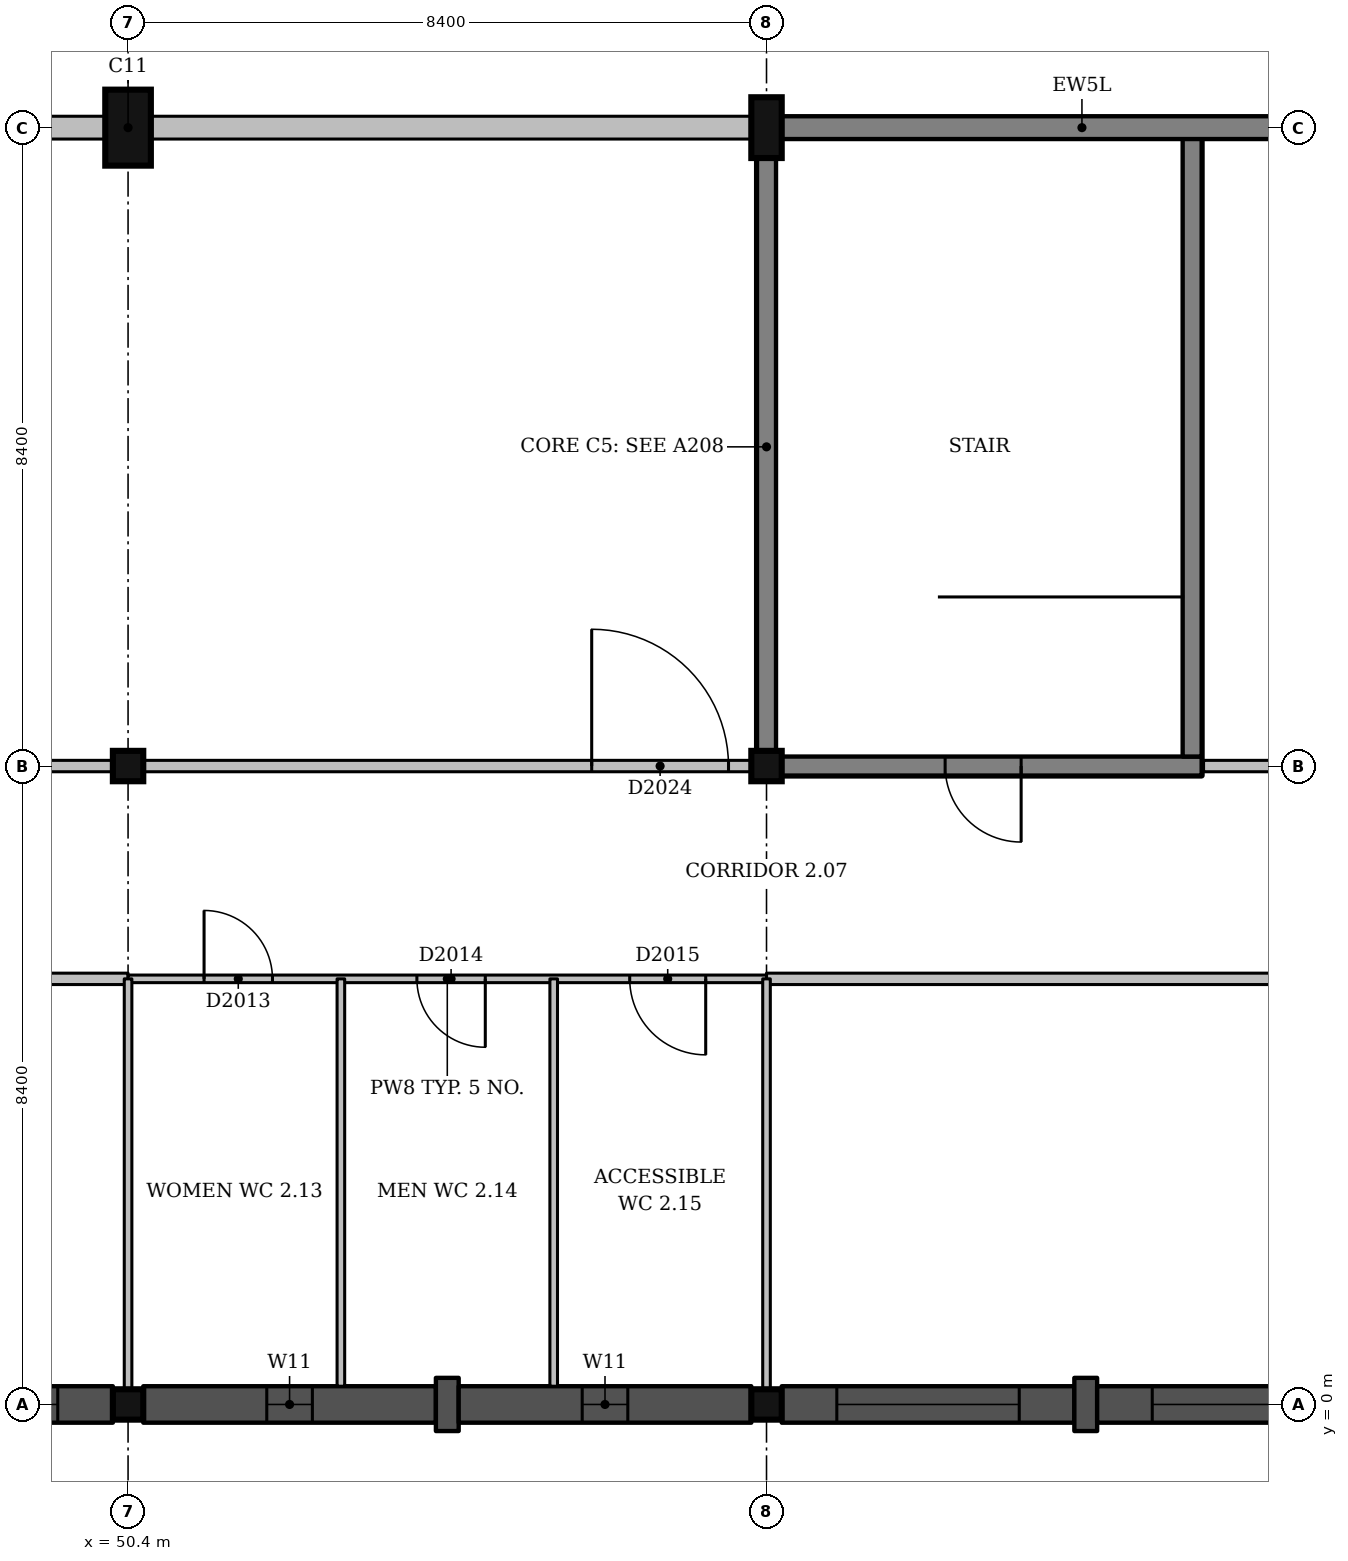
"""IFC4 building model, lengths in metres.
Left out: names, types, materials, properties, quantities, classifications, styles, units other than length and angle.
Written with IfcOpenShell. Run it as: python <this file> out.ifc"""

import sys

from ifc_helpers import new_model, si_unit, direction, frame, frame_2d, origin, origin_2d, place, context, subcontext, project, spatial, rectangle, extrude, element, fill, save


model = new_model("IFC4")
c1 = context("Model", 3, precision=1e-05, world=origin(), true_north=direction((0.0, 1.0)))
c2 = subcontext(c1, "Body", "Model", "MODEL_VIEW")
j1 = project(units=[si_unit("LENGTHUNIT", "METRE"), si_unit("PLANEANGLEUNIT", "RADIAN")], contexts=[c1])
p1 = place(None, origin())
s1 = spatial("IfcSite", under=j1, at=p1, CompositionType="ELEMENT")
p2 = place(p1, origin())
s2 = spatial("IfcBuilding", under=s1, at=p2, CompositionType="ELEMENT")
p3 = place(p2, frame((0.0, 0.0, 9.0)))
s3 = spatial("IfcBuildingStorey", under=s2, at=p3, CompositionType="ELEMENT", Elevation=9.0)
for number, where, z_axis, x_axis in (
    (1, (50.4, 0.0, 0.0), (0.0, 0.0, 1.0), (1.0, 0.0, 0.0)),
    (2, (50.4, 8.4, 0.0), (0.0, 0.0, 1.0), (1.0, 0.0, 0.0)),
):
    element("IfcColumn", number, at=place(p3, frame(where, z_axis=z_axis, x_axis=x_axis)), inside=s3, PredefinedType="COLUMN", context=c2, shape_type="SweptSolid", body=[
        extrude(rectangle(XDim=0.4, YDim=0.4, at=origin_2d()), origin(), (0.0, 0.0, 1.0), 4.5),
    ])
p4 = place(p3, frame((50.4, 16.8, 0.0), z_axis=(0.0, 0.0, 1.0), x_axis=(1.0, 0.0, 0.0)))
e3 = element("IfcColumn", 3, at=p4, inside=s3, PredefinedType="COLUMN", context=c2, shape_type="SweptSolid", body=[
    extrude(rectangle(XDim=0.6, YDim=1.0, at=origin_2d()), origin(), (0.0, 0.0, 1.0), 4.5),
])
for number, where, z_axis, x_axis in (
    (4, (58.8, 0.0, 0.0), (0.0, 0.0, 1.0), (1.0, 0.0, 0.0)),
    (5, (58.8, 8.4, 0.0), (0.0, 0.0, 1.0), (1.0, 0.0, 0.0)),
):
    element("IfcColumn", number, at=place(p3, frame(where, z_axis=z_axis, x_axis=x_axis)), inside=s3, PredefinedType="COLUMN", context=c2, shape_type="SweptSolid", body=[
        extrude(rectangle(XDim=0.4, YDim=0.4, at=origin_2d()), origin(), (0.0, 0.0, 1.0), 4.5),
    ])
p5 = place(p3, frame((58.8, 16.8, 0.0), z_axis=(0.0, 0.0, 1.0), x_axis=(1.0, 0.0, 0.0)))
e6 = element("IfcColumn", 6, at=p5, inside=s3, PredefinedType="COLUMN", context=c2, shape_type="SweptSolid", body=[
    extrude(rectangle(XDim=0.4, YDim=0.8, at=origin_2d()), origin(), (0.0, 0.0, 1.0), 4.5),
])
p6 = place(p3, frame((59.0, 8.4, 0.0), z_axis=(0.0, 0.0, 1.0), x_axis=(1.0, 0.0, 0.0)))
e7 = element("IfcWall", 7, at=p6, inside=s3, PredefinedType="SHEAR", context=c2, shape_type="SweptSolid", body=[
    extrude(rectangle(XDim=5.525, YDim=0.25, at=frame_2d((2.762, 0.0))), origin(), (0.0, 0.0, 1.0), 4.2),
])
p7 = place(p6, frame((2.15, 0.0, 0.0)))
e8 = element("IfcOpeningElement", 8, at=p7, cuts=e7, PredefinedType="OPENING", context=c2, shape_type="SweptSolid", body=[
    extrude(rectangle(XDim=1.0, YDim=2.1, at=frame_2d((0.5, 1.05))), frame((0.0, 0.135, 0.0), z_axis=(0.0, -1.0, 0.0), x_axis=(1.0, 0.0, 0.0)), (0.0, 0.0, 1.0), 0.27),
])
p8 = place(p3, frame((58.8, 8.6, 0.0), z_axis=(0.0, 0.0, 1.0), x_axis=(0.0, 1.0, 0.0)))
e9 = element("IfcWall", 9, at=p8, inside=s3, PredefinedType="SHEAR", context=c2, shape_type="SweptSolid", body=[
    extrude(rectangle(XDim=7.8, YDim=0.25, at=frame_2d((3.9, 0.0))), origin(), (0.0, 0.0, 1.0), 4.2),
])
p9 = place(p3, frame((64.4, 8.525, 0.0), z_axis=(0.0, 0.0, 1.0), x_axis=(0.0, 1.0, 0.0)))
e10 = element("IfcWall", 10, at=p9, inside=s3, PredefinedType="SHEAR", context=c2, shape_type="SweptSolid", body=[
    extrude(rectangle(XDim=8.15, YDim=0.25, at=frame_2d((4.075, 0.0))), origin(), (0.0, 0.0, 1.0), 4.2),
])
p10 = place(p3, frame((66.9, 16.8, 0.0), z_axis=(0.0, 0.0, 1.0), x_axis=(-1.0, 0.0, 0.0)))
e11 = element("IfcWall", 11, at=p10, inside=s3, PredefinedType="SOLIDWALL", context=c2, shape_type="SweptSolid", body=[
    extrude(rectangle(XDim=7.9, YDim=0.3, at=frame_2d((3.95, 0.0))), origin(), (0.0, 0.0, 1.0), 3.6),
])
for number, where, z_axis, x_axis in (
    (12, (58.6, 16.8, 0.0), (0.0, 0.0, 1.0), (-1.0, 0.0, 0.0)),
    (13, (50.1, 16.8, 0.0), (0.0, 0.0, 1.0), (-1.0, 0.0, 0.0)),
):
    element("IfcWall", number, at=place(p3, frame(where, z_axis=z_axis, x_axis=x_axis)), inside=s3, PredefinedType="SOLIDWALL", context=c2, shape_type="SweptSolid", body=[
        extrude(rectangle(XDim=7.9, YDim=0.3, at=frame_2d((3.95, 0.0))), origin(), (0.0, 0.0, 1.0), 3.6),
    ])
p11 = place(p3, frame((46.35, 0.0, 0.0), z_axis=(0.0, 0.0, 1.0), x_axis=(1.0, 0.0, 0.0)))
e14 = element("IfcWall", 14, at=p11, inside=s3, PredefinedType="SOLIDWALL", context=c2, shape_type="SweptSolid", body=[
    extrude(rectangle(XDim=3.85, YDim=0.48, at=frame_2d((1.925, 0.0))), origin(), (0.0, 0.0, 1.0), 3.6),
])
p12 = place(p11, frame((0.725, 0.0, 2.4)))
e15 = element("IfcOpeningElement", 15, at=p12, cuts=e14, PredefinedType="OPENING", context=c2, shape_type="SweptSolid", body=[
    extrude(rectangle(XDim=2.4, YDim=0.6, at=frame_2d((1.2, 0.3))), frame((0.0, 0.25, 0.0), z_axis=(0.0, -1.0, 0.0), x_axis=(1.0, 0.0, 0.0)), (0.0, 0.0, 1.0), 0.5),
])
p13 = place(p3, frame((50.6, 0.0, 0.0), z_axis=(0.0, 0.0, 1.0), x_axis=(1.0, 0.0, 0.0)))
e16 = element("IfcWall", 16, at=p13, inside=s3, PredefinedType="SOLIDWALL", context=c2, shape_type="SweptSolid", body=[
    extrude(rectangle(XDim=3.85, YDim=0.48, at=frame_2d((1.925, 0.0))), origin(), (0.0, 0.0, 1.0), 3.6),
])
p14 = place(p13, frame((1.625, 0.0, 1.5)))
e17 = element("IfcOpeningElement", 17, at=p14, cuts=e16, PredefinedType="OPENING", context=c2, shape_type="SweptSolid", body=[
    extrude(rectangle(XDim=0.6, YDim=1.2, at=frame_2d((0.3, 0.6))), frame((0.0, 0.25, 0.0), z_axis=(0.0, -1.0, 0.0), x_axis=(1.0, 0.0, 0.0)), (0.0, 0.0, 1.0), 0.5),
])
p15 = place(p3, frame((54.45, 0.0, 0.0), z_axis=(0.0, 0.0, 1.0), x_axis=(1.0, 0.0, 0.0)))
e18 = element("IfcWall", 18, at=p15, inside=s3, PredefinedType="SOLIDWALL", context=c2, shape_type="SweptSolid", body=[
    extrude(rectangle(XDim=0.3, YDim=0.7, at=frame_2d((0.15, 0.0))), origin(), (0.0, 0.0, 1.0), 3.6),
])
p16 = place(p3, frame((54.75, 0.0, 0.0), z_axis=(0.0, 0.0, 1.0), x_axis=(1.0, 0.0, 0.0)))
e19 = element("IfcWall", 19, at=p16, inside=s3, PredefinedType="SOLIDWALL", context=c2, shape_type="SweptSolid", body=[
    extrude(rectangle(XDim=3.85, YDim=0.48, at=frame_2d((1.925, 0.0))), origin(), (0.0, 0.0, 1.0), 3.6),
])
p17 = place(p16, frame((1.625, 0.0, 1.5)))
e20 = element("IfcOpeningElement", 20, at=p17, cuts=e19, PredefinedType="OPENING", context=c2, shape_type="SweptSolid", body=[
    extrude(rectangle(XDim=0.6, YDim=1.2, at=frame_2d((0.3, 0.6))), frame((0.0, 0.25, 0.0), z_axis=(0.0, -1.0, 0.0), x_axis=(1.0, 0.0, 0.0)), (0.0, 0.0, 1.0), 0.5),
])
p18 = place(p3, frame((59.0, 0.0, 0.0), z_axis=(0.0, 0.0, 1.0), x_axis=(1.0, 0.0, 0.0)))
e21 = element("IfcWall", 21, at=p18, inside=s3, PredefinedType="SOLIDWALL", context=c2, shape_type="SweptSolid", body=[
    extrude(rectangle(XDim=3.85, YDim=0.48, at=frame_2d((1.925, 0.0))), origin(), (0.0, 0.0, 1.0), 3.6),
])
p19 = place(p18, frame((0.725, 0.0, 2.4)))
e22 = element("IfcOpeningElement", 22, at=p19, cuts=e21, PredefinedType="OPENING", context=c2, shape_type="SweptSolid", body=[
    extrude(rectangle(XDim=2.4, YDim=0.6, at=frame_2d((1.2, 0.3))), frame((0.0, 0.25, 0.0), z_axis=(0.0, -1.0, 0.0), x_axis=(1.0, 0.0, 0.0)), (0.0, 0.0, 1.0), 0.5),
])
p20 = place(p3, frame((62.85, 0.0, 0.0), z_axis=(0.0, 0.0, 1.0), x_axis=(1.0, 0.0, 0.0)))
e23 = element("IfcWall", 23, at=p20, inside=s3, PredefinedType="SOLIDWALL", context=c2, shape_type="SweptSolid", body=[
    extrude(rectangle(XDim=0.3, YDim=0.7, at=frame_2d((0.15, 0.0))), origin(), (0.0, 0.0, 1.0), 3.6),
])
p21 = place(p3, frame((63.15, 0.0, 0.0), z_axis=(0.0, 0.0, 1.0), x_axis=(1.0, 0.0, 0.0)))
e24 = element("IfcWall", 24, at=p21, inside=s3, PredefinedType="SOLIDWALL", context=c2, shape_type="SweptSolid", body=[
    extrude(rectangle(XDim=3.85, YDim=0.48, at=frame_2d((1.925, 0.0))), origin(), (0.0, 0.0, 1.0), 3.6),
])
p22 = place(p21, frame((0.725, 0.0, 2.4)))
e25 = element("IfcOpeningElement", 25, at=p22, cuts=e24, PredefinedType="OPENING", context=c2, shape_type="SweptSolid", body=[
    extrude(rectangle(XDim=2.4, YDim=0.6, at=frame_2d((1.2, 0.3))), frame((0.0, 0.25, 0.0), z_axis=(0.0, -1.0, 0.0), x_axis=(1.0, 0.0, 0.0)), (0.0, 0.0, 1.0), 0.5),
])
p23 = place(p3, frame((41.2, 5.6, 0.0), z_axis=(0.0, 0.0, 1.0), x_axis=(1.0, 0.0, 0.0)))
e26 = element("IfcWall", 26, at=p23, inside=s3, PredefinedType="PARTITIONING", context=c2, shape_type="SweptSolid", body=[
    extrude(rectangle(XDim=9.2, YDim=0.15, at=frame_2d((4.6, 0.0))), origin(), (0.0, 0.0, 1.0), 3.6),
])
p24 = place(p23, frame((0.4, 0.0, 0.0)))
e27 = element("IfcOpeningElement", 27, at=p24, cuts=e26, PredefinedType="OPENING", context=c2, shape_type="SweptSolid", body=[
    extrude(rectangle(XDim=0.9, YDim=2.1, at=frame_2d((0.45, 1.05))), frame((0.0, 0.085, 0.0), z_axis=(0.0, -1.0, 0.0), x_axis=(1.0, 0.0, 0.0)), (0.0, 0.0, 1.0), 0.17),
])
p25 = place(p3, frame((58.8, 5.6, 0.0), z_axis=(0.0, 0.0, 1.0), x_axis=(1.0, 0.0, 0.0)))
e28 = element("IfcWall", 28, at=p25, inside=s3, PredefinedType="PARTITIONING", context=c2, shape_type="SweptSolid", body=[
    extrude(rectangle(XDim=22.4, YDim=0.15, at=frame_2d((11.2, 0.0))), origin(), (0.0, 0.0, 1.0), 3.6),
])
p26 = place(p25, frame((10.8, 0.0, 0.0)))
e29 = element("IfcOpeningElement", 29, at=p26, cuts=e28, PredefinedType="OPENING", context=c2, shape_type="SweptSolid", body=[
    extrude(rectangle(XDim=0.9, YDim=2.1, at=frame_2d((0.45, 1.05))), frame((0.0, 0.085, 0.0), z_axis=(0.0, -1.0, 0.0), x_axis=(1.0, 0.0, 0.0)), (0.0, 0.0, 1.0), 0.17),
])
p27 = place(p3, frame((50.4, 5.6, 0.0), z_axis=(0.0, 0.0, 1.0), x_axis=(1.0, 0.0, 0.0)))
e30 = element("IfcWall", 30, at=p27, inside=s3, PredefinedType="PARTITIONING", context=c2, shape_type="SweptSolid", body=[
    extrude(rectangle(XDim=8.4, YDim=0.1, at=frame_2d((4.2, 0.0))), origin(), (0.0, 0.0, 1.0), 3.6),
])
p28 = place(p27, frame((1.0, 0.0, 0.0)))
e31 = element("IfcOpeningElement", 31, at=p28, cuts=e30, PredefinedType="OPENING", context=c2, shape_type="SweptSolid", body=[
    extrude(rectangle(XDim=0.9, YDim=2.1, at=frame_2d((0.45, 1.05))), frame((0.0, 0.06, 0.0), z_axis=(0.0, -1.0, 0.0), x_axis=(1.0, 0.0, 0.0)), (0.0, 0.0, 1.0), 0.12),
])
p29 = place(p27, frame((3.8, 0.0, 0.0)))
e32 = element("IfcOpeningElement", 32, at=p29, cuts=e30, PredefinedType="OPENING", context=c2, shape_type="SweptSolid", body=[
    extrude(rectangle(XDim=0.9, YDim=2.1, at=frame_2d((0.45, 1.05))), frame((0.0, 0.06, 0.0), z_axis=(0.0, -1.0, 0.0), x_axis=(1.0, 0.0, 0.0)), (0.0, 0.0, 1.0), 0.12),
])
p30 = place(p27, frame((6.6, 0.0, 0.0)))
e33 = element("IfcOpeningElement", 33, at=p30, cuts=e30, PredefinedType="OPENING", context=c2, shape_type="SweptSolid", body=[
    extrude(rectangle(XDim=1.0, YDim=2.1, at=frame_2d((0.5, 1.05))), frame((0.0, 0.06, 0.0), z_axis=(0.0, -1.0, 0.0), x_axis=(1.0, 0.0, 0.0)), (0.0, 0.0, 1.0), 0.12),
])
p31 = place(p3, frame((42.2, 8.4, 0.0), z_axis=(0.0, 0.0, 1.0), x_axis=(1.0, 0.0, 0.0)))
e34 = element("IfcWall", 34, at=p31, inside=s3, PredefinedType="PARTITIONING", context=c2, shape_type="SweptSolid", body=[
    extrude(rectangle(XDim=8.0, YDim=0.15, at=frame_2d((4.0, 0.0))), origin(), (0.0, 0.0, 1.0), 3.6),
])
p32 = place(p3, frame((50.6, 8.4, 0.0), z_axis=(0.0, 0.0, 1.0), x_axis=(1.0, 0.0, 0.0)))
e35 = element("IfcWall", 35, at=p32, inside=s3, PredefinedType="PARTITIONING", context=c2, shape_type="SweptSolid", body=[
    extrude(rectangle(XDim=8.0, YDim=0.15, at=frame_2d((4.0, 0.0))), origin(), (0.0, 0.0, 1.0), 3.6),
])
p33 = place(p32, frame((5.9, 0.0, 0.0)))
e36 = element("IfcOpeningElement", 36, at=p33, cuts=e35, PredefinedType="OPENING", context=c2, shape_type="SweptSolid", body=[
    extrude(rectangle(XDim=1.8, YDim=2.1, at=frame_2d((0.9, 1.05))), frame((0.0, 0.085, 0.0), z_axis=(0.0, -1.0, 0.0), x_axis=(1.0, 0.0, 0.0)), (0.0, 0.0, 1.0), 0.17),
])
p34 = place(p3, frame((64.55, 8.4, 0.0), z_axis=(0.0, 0.0, 1.0), x_axis=(1.0, 0.0, 0.0)))
e37 = element("IfcWall", 37, at=p34, inside=s3, PredefinedType="PARTITIONING", context=c2, shape_type="SweptSolid", body=[
    extrude(rectangle(XDim=2.45, YDim=0.15, at=frame_2d((1.225, 0.0))), origin(), (0.0, 0.0, 1.0), 3.6),
])
p35 = place(p3, frame((50.4, 0.2, 0.0), z_axis=(0.0, 0.0, 1.0), x_axis=(0.0, 1.0, 0.0)))
e38 = element("IfcWall", 38, at=p35, inside=s3, PredefinedType="PARTITIONING", context=c2, shape_type="SweptSolid", body=[
    extrude(rectangle(XDim=5.4, YDim=0.1, at=frame_2d((2.7, 0.0))), origin(), (0.0, 0.0, 1.0), 3.6),
])
for number, where, z_axis, x_axis in (
    (39, (53.2, 0.24, 0.0), (0.0, 0.0, 1.0), (0.0, 1.0, 0.0)),
    (40, (56.0, 0.24, 0.0), (0.0, 0.0, 1.0), (0.0, 1.0, 0.0)),
):
    element("IfcWall", number, at=place(p3, frame(where, z_axis=z_axis, x_axis=x_axis)), inside=s3, PredefinedType="PARTITIONING", context=c2, shape_type="SweptSolid", body=[
        extrude(rectangle(XDim=5.36, YDim=0.1, at=frame_2d((2.68, 0.0))), origin(), (0.0, 0.0, 1.0), 4.15),
    ])
p36 = place(p3, frame((58.8, 0.2, 0.0), z_axis=(0.0, 0.0, 1.0), x_axis=(0.0, 1.0, 0.0)))
e41 = element("IfcWall", 41, at=p36, inside=s3, PredefinedType="PARTITIONING", context=c2, shape_type="SweptSolid", body=[
    extrude(rectangle(XDim=5.4, YDim=0.1, at=frame_2d((2.7, 0.0))), origin(), (0.0, 0.0, 1.0), 3.6),
])
p37 = place(p12, origin())
e42 = element("IfcWindow", 42, at=p37, inside=s3, PartitioningType="SINGLE_PANEL", PredefinedType="WINDOW", context=c2, shape_type="SweptSolid", body=[
    extrude(rectangle(XDim=2.4, YDim=0.6, at=frame_2d((1.2, 0.3))), frame((0.0, 0.12, 0.0), z_axis=(0.0, -1.0, 0.0), x_axis=(1.0, 0.0, 0.0)), (0.0, 0.0, 1.0), 0.06),
])
fill(e15, e42)
p38 = place(p14, origin())
e43 = element("IfcWindow", 43, at=p38, inside=s3, PartitioningType="SINGLE_PANEL", PredefinedType="WINDOW", context=c2, shape_type="SweptSolid", body=[
    extrude(rectangle(XDim=0.6, YDim=1.2, at=frame_2d((0.3, 0.6))), frame((0.0, 0.12, 0.0), z_axis=(0.0, -1.0, 0.0), x_axis=(1.0, 0.0, 0.0)), (0.0, 0.0, 1.0), 0.06),
])
fill(e17, e43)
p39 = place(p17, origin())
e44 = element("IfcWindow", 44, at=p39, inside=s3, PartitioningType="SINGLE_PANEL", PredefinedType="WINDOW", context=c2, shape_type="SweptSolid", body=[
    extrude(rectangle(XDim=0.6, YDim=1.2, at=frame_2d((0.3, 0.6))), frame((0.0, 0.12, 0.0), z_axis=(0.0, -1.0, 0.0), x_axis=(1.0, 0.0, 0.0)), (0.0, 0.0, 1.0), 0.06),
])
fill(e20, e44)
p40 = place(p19, origin())
e45 = element("IfcWindow", 45, at=p40, inside=s3, PartitioningType="SINGLE_PANEL", PredefinedType="WINDOW", context=c2, shape_type="SweptSolid", body=[
    extrude(rectangle(XDim=2.4, YDim=0.6, at=frame_2d((1.2, 0.3))), frame((0.0, 0.12, 0.0), z_axis=(0.0, -1.0, 0.0), x_axis=(1.0, 0.0, 0.0)), (0.0, 0.0, 1.0), 0.06),
])
fill(e22, e45)
p41 = place(p22, origin())
e46 = element("IfcWindow", 46, at=p41, inside=s3, PartitioningType="SINGLE_PANEL", PredefinedType="WINDOW", context=c2, shape_type="SweptSolid", body=[
    extrude(rectangle(XDim=2.4, YDim=0.6, at=frame_2d((1.2, 0.3))), frame((0.0, 0.12, 0.0), z_axis=(0.0, -1.0, 0.0), x_axis=(1.0, 0.0, 0.0)), (0.0, 0.0, 1.0), 0.06),
])
fill(e25, e46)
p42 = place(p3, frame((0.0, 0.0, 4.2)))
p43 = place(p42, frame((58.5, 9.9, 0.0)))
p44 = place(p43, frame((0.0, 0.0, 0.25)))
e47 = element("IfcWindow", 47, at=p44, inside=s3, PartitioningType="SINGLE_PANEL", PredefinedType="SKYLIGHT", context=c2, shape_type="SweptSolid", body=[
    extrude(rectangle(XDim=0.9, YDim=1.2, at=origin_2d()), origin(), (0.0, 0.0, 1.0), 0.05),
])
p45 = place(p28, origin())
e48 = element("IfcDoor", 48, at=p45, inside=s3, OperationType="SINGLE_SWING_LEFT", PredefinedType="DOOR", context=c2, shape_type="SweptSolid", body=[
    extrude(rectangle(XDim=0.9, YDim=2.1, at=frame_2d((0.45, 1.05))), frame((0.0, 0.025, 0.0), z_axis=(0.0, -1.0, 0.0), x_axis=(1.0, 0.0, 0.0)), (0.0, 0.0, 1.0), 0.05),
])
fill(e31, e48)
p46 = place(p29, origin())
e49 = element("IfcDoor", 49, at=p46, inside=s3, OperationType="SINGLE_SWING_RIGHT", PredefinedType="DOOR", context=c2, shape_type="SweptSolid", body=[
    extrude(rectangle(XDim=0.9, YDim=2.1, at=frame_2d((0.45, 1.05))), frame((0.0, 0.025, 0.0), z_axis=(0.0, -1.0, 0.0), x_axis=(1.0, 0.0, 0.0)), (0.0, 0.0, 1.0), 0.05),
])
fill(e32, e49)
p47 = place(p30, origin())
e50 = element("IfcDoor", 50, at=p47, inside=s3, OperationType="SINGLE_SWING_RIGHT", PredefinedType="DOOR", context=c2, shape_type="SweptSolid", body=[
    extrude(rectangle(XDim=1.0, YDim=2.1, at=frame_2d((0.5, 1.05))), frame((0.0, 0.025, 0.0), z_axis=(0.0, -1.0, 0.0), x_axis=(1.0, 0.0, 0.0)), (0.0, 0.0, 1.0), 0.05),
])
fill(e33, e50)
p48 = place(p33, origin())
e51 = element("IfcDoor", 51, at=p48, inside=s3, OperationType="DOUBLE_DOOR_SINGLE_SWING", PredefinedType="DOOR", context=c2, shape_type="SweptSolid", body=[
    extrude(rectangle(XDim=1.8, YDim=2.1, at=frame_2d((0.9, 1.05))), frame((0.0, 0.025, 0.0), z_axis=(0.0, -1.0, 0.0), x_axis=(1.0, 0.0, 0.0)), (0.0, 0.0, 1.0), 0.05),
])
fill(e36, e51)
p49 = place(p7, origin())
e52 = element("IfcDoor", 52, at=p49, inside=s3, OperationType="SINGLE_SWING_RIGHT", PredefinedType="DOOR", context=c2, shape_type="SweptSolid", body=[
    extrude(rectangle(XDim=1.0, YDim=2.1, at=frame_2d((0.5, 1.05))), frame((0.0, 0.025, 0.0), z_axis=(0.0, -1.0, 0.0), x_axis=(1.0, 0.0, 0.0)), (0.0, 0.0, 1.0), 0.05),
])
fill(e8, e52)
save(model, sys.argv[1])
